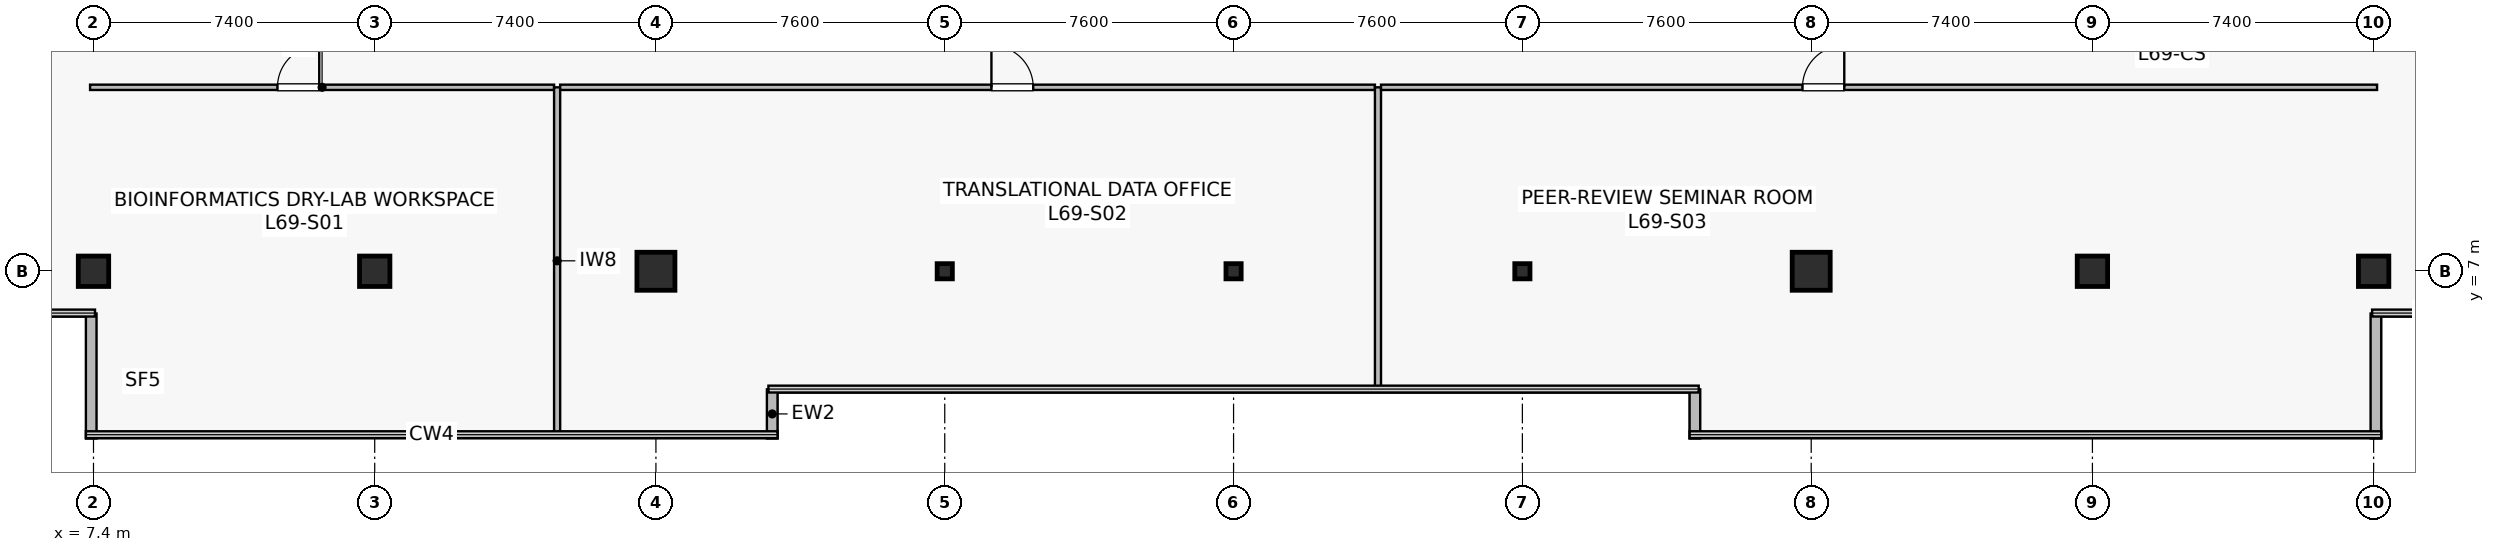
"""IFC4 building model, lengths in metres.
Left out: names, types, materials, properties, quantities, classifications, styles, units other than length and angle.
Written with IfcOpenShell. Run it as: python <this file> out.ifc"""

import sys

from ifc_helpers import new_model, si_unit, direction, frame, frame_2d, origin, origin_2d, place, context, subcontext, project, spatial, rectangle, hollow_rectangle, extrude, source, transform, mapped, element, fill, save


model = new_model("IFC4")
c1 = context("Model", 3, precision=1e-05, world=origin(), true_north=direction((0.0, 1.0)))
c2 = subcontext(c1, "Body", "Model", "MODEL_VIEW")
j1 = project(units=[si_unit("LENGTHUNIT", "METRE"), si_unit("PLANEANGLEUNIT", "RADIAN")], contexts=[c1])
p1 = place(None, origin())
s1 = spatial("IfcSite", under=j1, at=p1, CompositionType="ELEMENT")
p2 = place(p1, origin())
s2 = spatial("IfcBuilding", under=s1, at=p2, CompositionType="ELEMENT")
p3 = place(p2, frame((0.0, 0.0, 287.5)))
s3 = spatial("IfcBuildingStorey", under=s2, at=p3, CompositionType="ELEMENT", Elevation=287.5)
m1 = source(origin(), c2, "Body", "SweptSolid", [
    extrude(rectangle(XDim=0.8, YDim=0.8, at=origin_2d()), origin(), (0.0, 0.0, 1.0), 4.1),
])
p4 = place(p3, frame((14.8, 7.0, 0.0), z_axis=(0.0, 0.0, 1.0), x_axis=(1.0, 0.0, 0.0)))
e1 = element("IfcColumn", 1, at=p4, inside=s3, PredefinedType="COLUMN", context=c2, shape_type="MappedRepresentation", body=[
    mapped(m1, transform((0.0, 0.0, 0.0), scale=1.0)),
])
m2 = source(origin(), c2, "Body", "SweptSolid", [
    extrude(rectangle(XDim=1.0, YDim=1.0, at=origin_2d()), origin(), (0.0, 0.0, 1.0), 4.1),
])
for number, where, z_axis, x_axis in (
    (2, (22.2, 7.0, 0.0), (0.0, 0.0, 1.0), (1.0, 0.0, 0.0)),
    (3, (52.6, 7.0, 0.0), (0.0, 0.0, 1.0), (1.0, 0.0, 0.0)),
):
    element("IfcColumn", number, at=place(p3, frame(where, z_axis=z_axis, x_axis=x_axis)), inside=s3, PredefinedType="COLUMN", context=c2, shape_type="MappedRepresentation", body=[
        mapped(m2, transform((0.0, 0.0, 0.0), scale=1.0)),
    ])
for number, where, z_axis, x_axis in (
    (4, (60.0, 7.0, 0.0), (0.0, 0.0, 1.0), (1.0, 0.0, 0.0)),
    (5, (7.4, 7.0, 0.0), (0.0, 0.0, 1.0), (1.0, 0.0, 0.0)),
    (6, (67.4, 7.0, 0.0), (0.0, 0.0, 1.0), (1.0, 0.0, 0.0)),
):
    element("IfcColumn", number, at=place(p3, frame(where, z_axis=z_axis, x_axis=x_axis)), inside=s3, PredefinedType="COLUMN", context=c2, shape_type="MappedRepresentation", body=[
        mapped(m1, transform((0.0, 0.0, 0.0), scale=1.0)),
    ])
m3 = source(origin(), c2, "Body", "SweptSolid", [
    extrude(hollow_rectangle(XDim=0.4, YDim=0.4, WallThickness=0.019, at=origin_2d()), origin(), (0.0, 0.0, 1.0), 4.1),
])
for number, where, z_axis, x_axis in (
    (7, (29.8, 7.0, 0.0), (0.0, 0.0, 1.0), (1.0, 0.0, 0.0)),
    (8, (37.4, 7.0, 0.0), (0.0, 0.0, 1.0), (1.0, 0.0, 0.0)),
    (9, (45.0, 7.0, 0.0), (0.0, 0.0, 1.0), (1.0, 0.0, 0.0)),
):
    element("IfcColumn", number, at=place(p3, frame(where, z_axis=z_axis, x_axis=x_axis)), inside=s3, PredefinedType="COLUMN", context=c2, shape_type="MappedRepresentation", body=[
        mapped(m3, transform((0.0, 0.0, 0.0), scale=1.0)),
    ])
for number, where, z_axis, x_axis in (
    (10, (25.26, 2.6, 0.0), (0.0, 0.0, 1.0), (0.0, 1.0, 0.0)),
    (11, (49.54, 3.893, 0.0), (0.0, 0.0, 1.0), (0.0, -1.0, 0.0)),
):
    element("IfcWall", number, at=place(p3, frame(where, z_axis=z_axis, x_axis=x_axis)), inside=s3, PredefinedType="STANDARD", context=c2, shape_type="SweptSolid", body=[
        extrude(rectangle(XDim=1.293, YDim=0.28, at=frame_2d((0.646, 0.0))), origin(), (0.0, 0.0, 1.0), 3.8),
    ])
for number, where, z_axis, x_axis in (
    (12, (67.46, 2.6, 0.0), (0.0, 0.0, 1.0), (0.0, 1.0, 0.0)),
    (13, (7.34, 5.888, 0.0), (0.0, 0.0, 1.0), (0.0, -1.0, 0.0)),
):
    element("IfcWall", number, at=place(p3, frame(where, z_axis=z_axis, x_axis=x_axis)), inside=s3, PredefinedType="STANDARD", context=c2, shape_type="SweptSolid", body=[
        extrude(rectangle(XDim=3.288, YDim=0.28, at=frame_2d((1.644, 0.0))), origin(), (0.0, 0.0, 1.0), 3.8),
    ])
p5 = place(p3, frame((7.31, 11.84, 0.0), z_axis=(0.0, 0.0, 1.0), x_axis=(1.0, 0.0, 0.0)))
e14 = element("IfcWall", 14, at=p5, inside=s3, PredefinedType="PARTITIONING", context=c2, shape_type="SweptSolid", body=[
    extrude(rectangle(XDim=12.21, YDim=0.14, at=frame_2d((6.105, 0.0))), origin(), (0.0, 0.0, 1.0), 3.197),
])
p6 = place(p5, frame((4.93, 0.0, 0.0)))
e15 = element("IfcOpeningElement", 15, at=p6, cuts=e14, PredefinedType="OPENING", context=c2, shape_type="SweptSolid", body=[
    extrude(rectangle(XDim=1.1, YDim=2.18, at=frame_2d((0.55, 1.09))), frame((0.0, 0.08, 0.0), z_axis=(0.0, -1.0, 0.0), x_axis=(1.0, 0.0, 0.0)), (0.0, 0.0, 1.0), 0.16),
])
p7 = place(p3, frame((19.6, 2.71, 0.0), z_axis=(0.0, 0.0, 1.0), x_axis=(0.0, 1.0, 0.0)))
e16 = element("IfcWall", 16, at=p7, inside=s3, PredefinedType="PARTITIONING", context=c2, shape_type="SweptSolid", body=[
    extrude(rectangle(XDim=9.13, YDim=0.16, at=frame_2d((4.565, 0.0))), origin(), (0.0, 0.0, 1.0), 3.135),
])
p8 = place(p3, frame((19.68, 11.84, 0.0), z_axis=(0.0, 0.0, 1.0), x_axis=(1.0, 0.0, 0.0)))
e17 = element("IfcWall", 17, at=p8, inside=s3, PredefinedType="PARTITIONING", context=c2, shape_type="SweptSolid", body=[
    extrude(rectangle(XDim=21.44, YDim=0.14, at=frame_2d((10.72, 0.0))), origin(), (0.0, 0.0, 1.0), 3.197),
])
p9 = place(p8, frame((11.348, 0.0, 0.0)))
e18 = element("IfcOpeningElement", 18, at=p9, cuts=e17, PredefinedType="OPENING", context=c2, shape_type="SweptSolid", body=[
    extrude(rectangle(XDim=1.1, YDim=2.18, at=frame_2d((0.55, 1.09))), frame((0.0, 0.08, 0.0), z_axis=(0.0, -1.0, 0.0), x_axis=(1.0, 0.0, 0.0)), (0.0, 0.0, 1.0), 0.16),
])
p10 = place(p3, frame((41.2, 3.91, 0.0), z_axis=(0.0, 0.0, 1.0), x_axis=(0.0, 1.0, 0.0)))
e19 = element("IfcWall", 19, at=p10, inside=s3, PredefinedType="PARTITIONING", context=c2, shape_type="SweptSolid", body=[
    extrude(rectangle(XDim=7.93, YDim=0.16, at=frame_2d((3.965, 0.0))), origin(), (0.0, 0.0, 1.0), 3.135),
])
p11 = place(p3, frame((41.28, 11.84, 0.0), z_axis=(0.0, 0.0, 1.0), x_axis=(1.0, 0.0, 0.0)))
e20 = element("IfcWall", 20, at=p11, inside=s3, PredefinedType="PARTITIONING", context=c2, shape_type="SweptSolid", body=[
    extrude(rectangle(XDim=26.21, YDim=0.14, at=frame_2d((13.105, 0.0))), origin(), (0.0, 0.0, 1.0), 3.197),
])
p12 = place(p11, frame((11.09, 0.0, 0.0)))
e21 = element("IfcOpeningElement", 21, at=p12, cuts=e20, PredefinedType="OPENING", context=c2, shape_type="SweptSolid", body=[
    extrude(rectangle(XDim=1.1, YDim=2.18, at=frame_2d((0.55, 1.09))), frame((0.0, 0.08, 0.0), z_axis=(0.0, -1.0, 0.0), x_axis=(1.0, 0.0, 0.0)), (0.0, 0.0, 1.0), 0.16),
])
m4 = source(origin(), c2, "Body", "SweptSolid", [
    extrude(rectangle(XDim=1.1, YDim=2.18, at=frame_2d((0.55, 1.09))), frame((0.0, 0.025, 0.0), z_axis=(0.0, -1.0, 0.0), x_axis=(1.0, 0.0, 0.0)), (0.0, 0.0, 1.0), 0.05),
])
p13 = place(p6, origin())
e22 = element("IfcDoor", 22, at=p13, inside=s3, OperationType="SINGLE_SWING_RIGHT", PredefinedType="DOOR", context=c2, shape_type="MappedRepresentation", body=[
    mapped(m4, transform((0.0, 0.0, 0.0), scale=1.0)),
])
fill(e15, e22)
p14 = place(p9, origin())
e23 = element("IfcDoor", 23, at=p14, inside=s3, OperationType="SINGLE_SWING_LEFT", PredefinedType="DOOR", context=c2, shape_type="MappedRepresentation", body=[
    mapped(m4, transform((0.0, 0.0, 0.0), scale=1.0)),
])
fill(e18, e23)
p15 = place(p12, origin())
e24 = element("IfcDoor", 24, at=p15, inside=s3, OperationType="SINGLE_SWING_RIGHT", PredefinedType="DOOR", context=c2, shape_type="MappedRepresentation", body=[
    mapped(m4, transform((0.0, 0.0, 0.0), scale=1.0)),
])
fill(e21, e24)
save(model, sys.argv[1])
